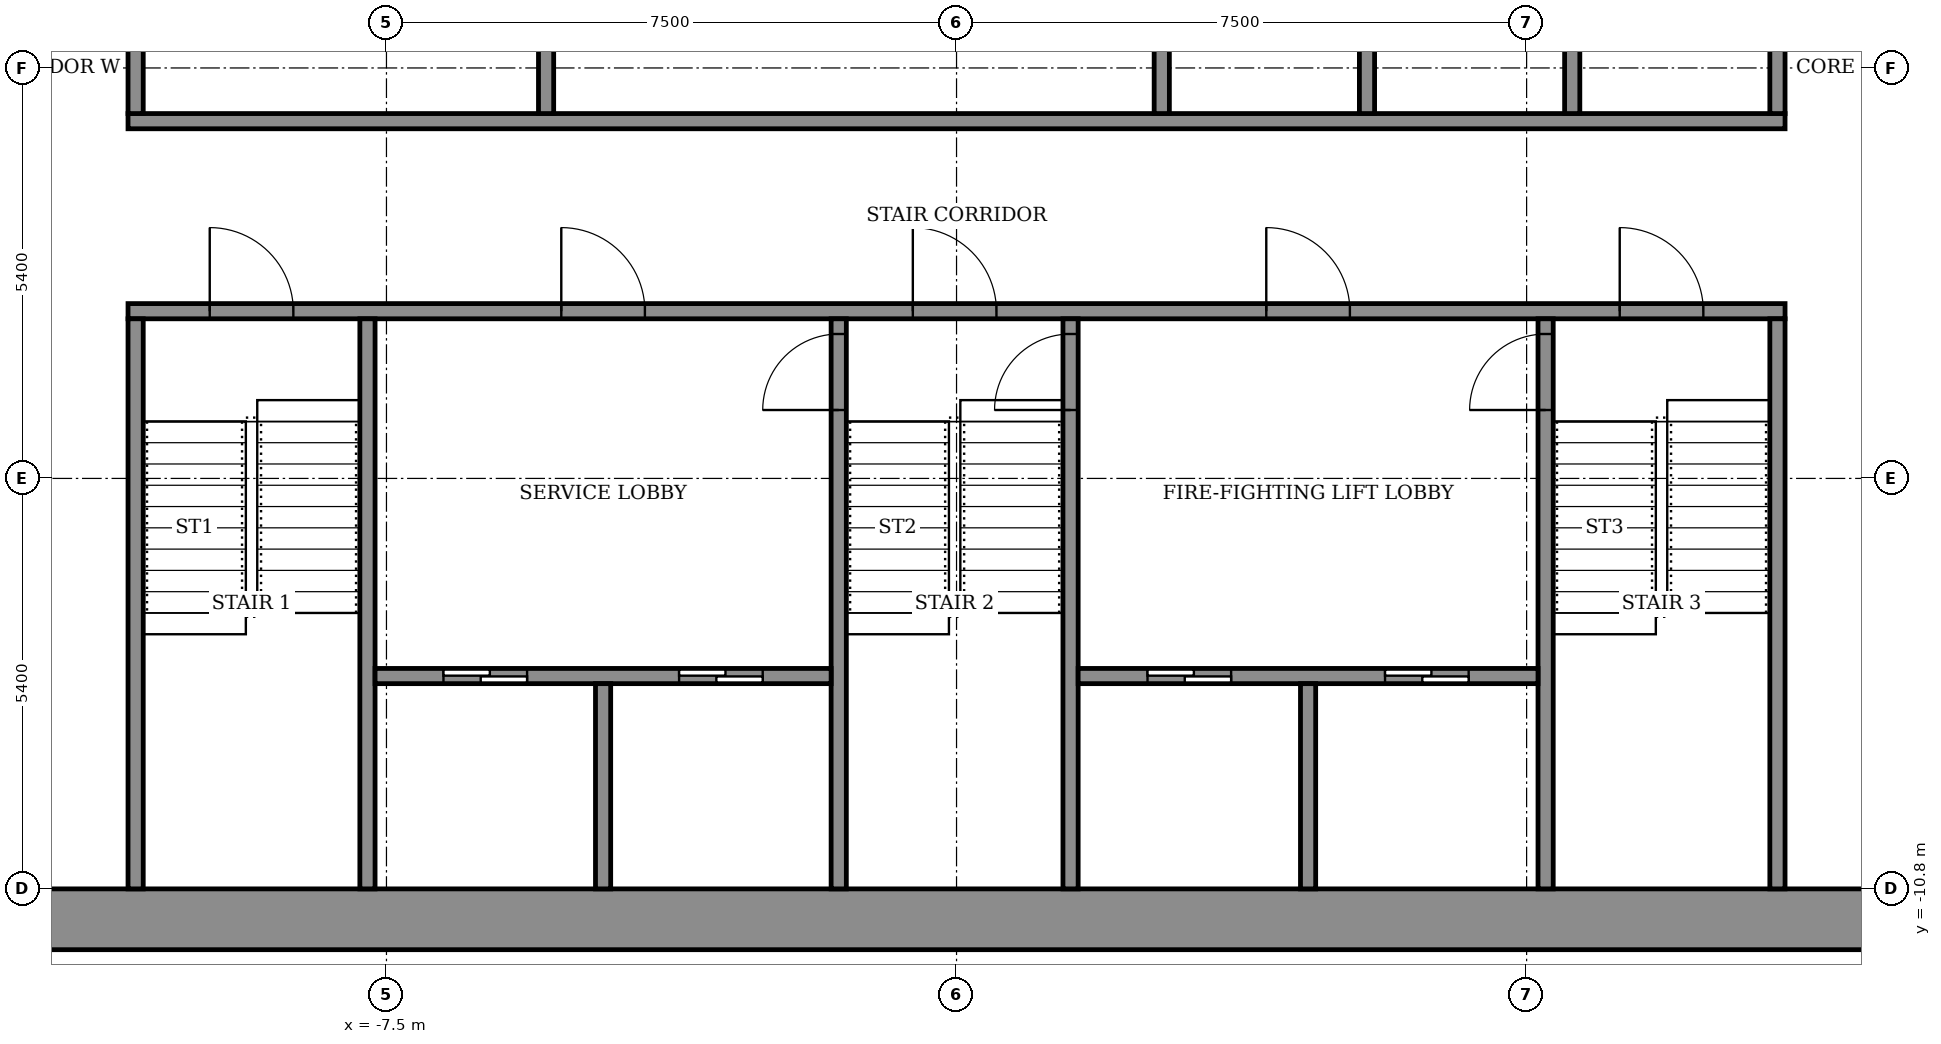
"""IFC4 building model, lengths in metres.
Left out: names, types, materials, properties, quantities, classifications, styles, units other than length and angle.
Written with IfcOpenShell. Run it as: python <this file> out.ifc"""

import sys

from ifc_helpers import new_model, si_unit, direction, frame, frame_2d, origin, place, context, subcontext, project, spatial, rectangle, extrude, element, fill, save


model = new_model("IFC4")
c1 = context("Model", 3, precision=1e-05, world=origin(), true_north=direction((0.0, 1.0)))
c2 = subcontext(c1, "Body", "Model", "MODEL_VIEW")
j1 = project(units=[si_unit("LENGTHUNIT", "METRE"), si_unit("PLANEANGLEUNIT", "RADIAN")], contexts=[c1])
p1 = place(None, origin())
s1 = spatial("IfcSite", under=j1, at=p1, CompositionType="ELEMENT")
p2 = place(p1, origin())
s2 = spatial("IfcBuilding", under=s1, at=p2, CompositionType="ELEMENT")
p3 = place(p2, frame((0.0, 0.0, 208.7)))
s3 = spatial("IfcBuildingStorey", under=s2, at=p3, CompositionType="ELEMENT", Elevation=208.7)
p4 = place(p3, frame((-14.6, -11.2, 0.0), z_axis=(0.0, 0.0, 1.0), x_axis=(1.0, 0.0, 0.0)))
e1 = element("IfcWall", 1, at=p4, inside=s3, PredefinedType="SHEAR", context=c2, shape_type="SweptSolid", body=[
    extrude(rectangle(XDim=29.2, YDim=0.8, at=frame_2d((14.6, 0.0))), origin(), (0.0, 0.0, 1.0), 3.6),
])
p5 = place(p3, frame((-10.9, -3.2, 0.0), z_axis=(0.0, 0.0, 1.0), x_axis=(1.0, 0.0, 0.0)))
e2 = element("IfcWall", 2, at=p5, inside=s3, PredefinedType="SHEAR", context=c2, shape_type="SweptSolid", body=[
    extrude(rectangle(XDim=21.8, YDim=0.2, at=frame_2d((10.9, 0.0))), origin(), (0.0, 0.0, 1.0), 3.05),
])
p6 = place(p5, frame((1.075, 0.0, 0.0)))
e3 = element("IfcOpeningElement", 3, at=p6, cuts=e2, PredefinedType="OPENING", context=c2, shape_type="SweptSolid", body=[
    extrude(rectangle(XDim=1.1, YDim=2.1, at=frame_2d((0.55, 1.05))), frame((0.0, 0.11, 0.0), z_axis=(0.0, -1.0, 0.0), x_axis=(1.0, 0.0, 0.0)), (0.0, 0.0, 1.0), 0.22),
])
p7 = place(p5, frame((10.325, 0.0, 0.0)))
e4 = element("IfcOpeningElement", 4, at=p7, cuts=e2, PredefinedType="OPENING", context=c2, shape_type="SweptSolid", body=[
    extrude(rectangle(XDim=1.1, YDim=2.1, at=frame_2d((0.55, 1.05))), frame((0.0, 0.11, 0.0), z_axis=(0.0, -1.0, 0.0), x_axis=(1.0, 0.0, 0.0)), (0.0, 0.0, 1.0), 0.22),
])
p8 = place(p5, frame((19.625, 0.0, 0.0)))
e5 = element("IfcOpeningElement", 5, at=p8, cuts=e2, PredefinedType="OPENING", context=c2, shape_type="SweptSolid", body=[
    extrude(rectangle(XDim=1.1, YDim=2.1, at=frame_2d((0.55, 1.05))), frame((0.0, 0.11, 0.0), z_axis=(0.0, -1.0, 0.0), x_axis=(1.0, 0.0, 0.0)), (0.0, 0.0, 1.0), 0.22),
])
p9 = place(p5, frame((5.7, 0.0, 0.0)))
e6 = element("IfcOpeningElement", 6, at=p9, cuts=e2, PredefinedType="OPENING", context=c2, shape_type="SweptSolid", body=[
    extrude(rectangle(XDim=1.1, YDim=2.1, at=frame_2d((0.55, 1.05))), frame((0.0, 0.11, 0.0), z_axis=(0.0, -1.0, 0.0), x_axis=(1.0, 0.0, 0.0)), (0.0, 0.0, 1.0), 0.22),
])
p10 = place(p5, frame((14.975, 0.0, 0.0)))
e7 = element("IfcOpeningElement", 7, at=p10, cuts=e2, PredefinedType="OPENING", context=c2, shape_type="SweptSolid", body=[
    extrude(rectangle(XDim=1.1, YDim=2.1, at=frame_2d((0.55, 1.05))), frame((0.0, 0.11, 0.0), z_axis=(0.0, -1.0, 0.0), x_axis=(1.0, 0.0, 0.0)), (0.0, 0.0, 1.0), 0.22),
])
p11 = place(p3, frame((-10.9, -0.7, 0.0), z_axis=(0.0, 0.0, 1.0), x_axis=(1.0, 0.0, 0.0)))
e8 = element("IfcWall", 8, at=p11, inside=s3, PredefinedType="SHEAR", context=c2, shape_type="SweptSolid", body=[
    extrude(rectangle(XDim=21.8, YDim=0.2, at=frame_2d((10.9, 0.0))), origin(), (0.0, 0.0, 1.0), 3.05),
])
for number, where, z_axis, x_axis in (
    (9, (-10.8, -10.8, 0.0), (0.0, 0.0, 1.0), (0.0, 1.0, 0.0)),
    (10, (-7.75, -10.8, 0.0), (0.0, 0.0, 1.0), (0.0, 1.0, 0.0)),
):
    element("IfcWall", number, at=place(p3, frame(where, z_axis=z_axis, x_axis=x_axis)), inside=s3, PredefinedType="SHEAR", context=c2, shape_type="SweptSolid", body=[
        extrude(rectangle(XDim=7.5, YDim=0.2, at=frame_2d((3.75, 0.0))), origin(), (0.0, 0.0, 1.0), 3.05),
    ])
p12 = place(p3, frame((-1.55, -10.8, 0.0), z_axis=(0.0, 0.0, 1.0), x_axis=(0.0, 1.0, 0.0)))
e11 = element("IfcWall", 11, at=p12, inside=s3, PredefinedType="SHEAR", context=c2, shape_type="SweptSolid", body=[
    extrude(rectangle(XDim=7.5, YDim=0.2, at=frame_2d((3.75, 0.0))), origin(), (0.0, 0.0, 1.0), 3.05),
])
p13 = place(p12, frame((6.3, 0.0, 0.0)))
e12 = element("IfcOpeningElement", 12, at=p13, cuts=e11, PredefinedType="OPENING", context=c2, shape_type="SweptSolid", body=[
    extrude(rectangle(XDim=1.0, YDim=2.1, at=frame_2d((0.5, 1.05))), frame((0.0, 0.11, 0.0), z_axis=(0.0, -1.0, 0.0), x_axis=(1.0, 0.0, 0.0)), (0.0, 0.0, 1.0), 0.22),
])
p14 = place(p3, frame((1.5, -10.8, 0.0), z_axis=(0.0, 0.0, 1.0), x_axis=(0.0, 1.0, 0.0)))
e13 = element("IfcWall", 13, at=p14, inside=s3, PredefinedType="SHEAR", context=c2, shape_type="SweptSolid", body=[
    extrude(rectangle(XDim=7.5, YDim=0.2, at=frame_2d((3.75, 0.0))), origin(), (0.0, 0.0, 1.0), 3.05),
])
p15 = place(p14, frame((6.3, 0.0, 0.0)))
e14 = element("IfcOpeningElement", 14, at=p15, cuts=e13, PredefinedType="OPENING", context=c2, shape_type="SweptSolid", body=[
    extrude(rectangle(XDim=1.0, YDim=2.1, at=frame_2d((0.5, 1.05))), frame((0.0, 0.11, 0.0), z_axis=(0.0, -1.0, 0.0), x_axis=(1.0, 0.0, 0.0)), (0.0, 0.0, 1.0), 0.22),
])
p16 = place(p3, frame((7.75, -10.8, 0.0), z_axis=(0.0, 0.0, 1.0), x_axis=(0.0, 1.0, 0.0)))
e15 = element("IfcWall", 15, at=p16, inside=s3, PredefinedType="SHEAR", context=c2, shape_type="SweptSolid", body=[
    extrude(rectangle(XDim=7.5, YDim=0.2, at=frame_2d((3.75, 0.0))), origin(), (0.0, 0.0, 1.0), 3.05),
])
p17 = place(p16, frame((6.3, 0.0, 0.0)))
e16 = element("IfcOpeningElement", 16, at=p17, cuts=e15, PredefinedType="OPENING", context=c2, shape_type="SweptSolid", body=[
    extrude(rectangle(XDim=1.0, YDim=2.1, at=frame_2d((0.5, 1.05))), frame((0.0, 0.11, 0.0), z_axis=(0.0, -1.0, 0.0), x_axis=(1.0, 0.0, 0.0)), (0.0, 0.0, 1.0), 0.22),
])
p18 = place(p3, frame((10.8, -10.8, 0.0), z_axis=(0.0, 0.0, 1.0), x_axis=(0.0, 1.0, 0.0)))
e17 = element("IfcWall", 17, at=p18, inside=s3, PredefinedType="SHEAR", context=c2, shape_type="SweptSolid", body=[
    extrude(rectangle(XDim=7.5, YDim=0.2, at=frame_2d((3.75, 0.0))), origin(), (0.0, 0.0, 1.0), 3.05),
])
p19 = place(p3, frame((-7.65, -8.0, 0.0), z_axis=(0.0, 0.0, 1.0), x_axis=(1.0, 0.0, 0.0)))
e18 = element("IfcWall", 18, at=p19, inside=s3, PredefinedType="SHEAR", context=c2, shape_type="SweptSolid", body=[
    extrude(rectangle(XDim=6.0, YDim=0.2, at=frame_2d((3.0, 0.0))), origin(), (0.0, 0.0, 1.0), 3.05),
])
p20 = place(p19, frame((0.9, 0.0, 0.0)))
e19 = element("IfcOpeningElement", 19, at=p20, cuts=e18, PredefinedType="OPENING", context=c2, shape_type="SweptSolid", body=[
    extrude(rectangle(XDim=1.1, YDim=2.1, at=frame_2d((0.55, 1.05))), frame((0.0, 0.11, 0.0), z_axis=(0.0, -1.0, 0.0), x_axis=(1.0, 0.0, 0.0)), (0.0, 0.0, 1.0), 0.22),
])
p21 = place(p19, frame((4.0, 0.0, 0.0)))
e20 = element("IfcOpeningElement", 20, at=p21, cuts=e18, PredefinedType="OPENING", context=c2, shape_type="SweptSolid", body=[
    extrude(rectangle(XDim=1.1, YDim=2.1, at=frame_2d((0.55, 1.05))), frame((0.0, 0.11, 0.0), z_axis=(0.0, -1.0, 0.0), x_axis=(1.0, 0.0, 0.0)), (0.0, 0.0, 1.0), 0.22),
])
p22 = place(p3, frame((-4.65, -10.8, 0.0), z_axis=(0.0, 0.0, 1.0), x_axis=(0.0, 1.0, 0.0)))
e21 = element("IfcWall", 21, at=p22, inside=s3, PredefinedType="SHEAR", context=c2, shape_type="SweptSolid", body=[
    extrude(rectangle(XDim=2.7, YDim=0.2, at=frame_2d((1.35, 0.0))), origin(), (0.0, 0.0, 1.0), 3.05),
])
p23 = place(p3, frame((1.6, -8.0, 0.0), z_axis=(0.0, 0.0, 1.0), x_axis=(1.0, 0.0, 0.0)))
e22 = element("IfcWall", 22, at=p23, inside=s3, PredefinedType="SHEAR", context=c2, shape_type="SweptSolid", body=[
    extrude(rectangle(XDim=6.05, YDim=0.2, at=frame_2d((3.025, 0.0))), origin(), (0.0, 0.0, 1.0), 3.05),
])
p24 = place(p23, frame((0.913, 0.0, 0.0)))
e23 = element("IfcOpeningElement", 23, at=p24, cuts=e22, PredefinedType="OPENING", context=c2, shape_type="SweptSolid", body=[
    extrude(rectangle(XDim=1.1, YDim=2.1, at=frame_2d((0.55, 1.05))), frame((0.0, 0.11, 0.0), z_axis=(0.0, -1.0, 0.0), x_axis=(1.0, 0.0, 0.0)), (0.0, 0.0, 1.0), 0.22),
])
p25 = place(p23, frame((4.038, 0.0, 0.0)))
e24 = element("IfcOpeningElement", 24, at=p25, cuts=e22, PredefinedType="OPENING", context=c2, shape_type="SweptSolid", body=[
    extrude(rectangle(XDim=1.1, YDim=2.1, at=frame_2d((0.55, 1.05))), frame((0.0, 0.11, 0.0), z_axis=(0.0, -1.0, 0.0), x_axis=(1.0, 0.0, 0.0)), (0.0, 0.0, 1.0), 0.22),
])
p26 = place(p3, frame((4.625, -10.8, 0.0), z_axis=(0.0, 0.0, 1.0), x_axis=(0.0, 1.0, 0.0)))
e25 = element("IfcWall", 25, at=p26, inside=s3, PredefinedType="SHEAR", context=c2, shape_type="SweptSolid", body=[
    extrude(rectangle(XDim=2.7, YDim=0.2, at=frame_2d((1.35, 0.0))), origin(), (0.0, 0.0, 1.0), 3.05),
])
for number, where, z_axis, x_axis in (
    (26, (-10.8, -0.6, 0.0), (0.0, 0.0, 1.0), (0.0, 1.0, 0.0)),
    (27, (-5.4, -0.6, 0.0), (0.0, 0.0, 1.0), (0.0, 1.0, 0.0)),
):
    element("IfcWall", number, at=place(p3, frame(where, z_axis=z_axis, x_axis=x_axis)), inside=s3, PredefinedType="STANDARD", context=c2, shape_type="SweptSolid", body=[
        extrude(rectangle(XDim=2.5, YDim=0.2, at=frame_2d((1.25, 0.0))), origin(), (0.0, 0.0, 1.0), 3.05),
    ])
for number, where, z_axis, x_axis in (
    (28, (2.7, -0.6, 0.0), (0.0, 0.0, 1.0), (0.0, 1.0, 0.0)),
    (29, (5.4, -0.6, 0.0), (0.0, 0.0, 1.0), (0.0, 1.0, 0.0)),
    (30, (8.1, -0.6, 0.0), (0.0, 0.0, 1.0), (0.0, 1.0, 0.0)),
    (31, (10.8, -0.6, 0.0), (0.0, 0.0, 1.0), (0.0, 1.0, 0.0)),
):
    element("IfcWall", number, at=place(p3, frame(where, z_axis=z_axis, x_axis=x_axis)), inside=s3, PredefinedType="SHEAR", context=c2, shape_type="SweptSolid", body=[
        extrude(rectangle(XDim=2.5, YDim=0.2, at=frame_2d((1.25, 0.0))), origin(), (0.0, 0.0, 1.0), 3.05),
    ])
p27 = place(p24, origin())
e32 = element("IfcDoor", 32, at=p27, inside=s3, OperationType="SLIDING_TO_LEFT", PredefinedType="DOOR", context=c2, shape_type="SweptSolid", body=[
    extrude(rectangle(XDim=1.1, YDim=2.1, at=frame_2d((0.55, 1.05))), frame((0.0, 0.025, 0.0), z_axis=(0.0, -1.0, 0.0), x_axis=(1.0, 0.0, 0.0)), (0.0, 0.0, 1.0), 0.05),
])
fill(e23, e32)
p28 = place(p20, origin())
e33 = element("IfcDoor", 33, at=p28, inside=s3, OperationType="SLIDING_TO_LEFT", PredefinedType="DOOR", context=c2, shape_type="SweptSolid", body=[
    extrude(rectangle(XDim=1.1, YDim=2.1, at=frame_2d((0.55, 1.05))), frame((0.0, 0.025, 0.0), z_axis=(0.0, -1.0, 0.0), x_axis=(1.0, 0.0, 0.0)), (0.0, 0.0, 1.0), 0.05),
])
fill(e19, e33)
p29 = place(p25, origin())
e34 = element("IfcDoor", 34, at=p29, inside=s3, OperationType="SLIDING_TO_LEFT", PredefinedType="DOOR", context=c2, shape_type="SweptSolid", body=[
    extrude(rectangle(XDim=1.1, YDim=2.1, at=frame_2d((0.55, 1.05))), frame((0.0, 0.025, 0.0), z_axis=(0.0, -1.0, 0.0), x_axis=(1.0, 0.0, 0.0)), (0.0, 0.0, 1.0), 0.05),
])
fill(e24, e34)
p30 = place(p21, origin())
e35 = element("IfcDoor", 35, at=p30, inside=s3, OperationType="SLIDING_TO_LEFT", PredefinedType="DOOR", context=c2, shape_type="SweptSolid", body=[
    extrude(rectangle(XDim=1.1, YDim=2.1, at=frame_2d((0.55, 1.05))), frame((0.0, 0.025, 0.0), z_axis=(0.0, -1.0, 0.0), x_axis=(1.0, 0.0, 0.0)), (0.0, 0.0, 1.0), 0.05),
])
fill(e20, e35)
p31 = place(p6, origin())
e36 = element("IfcDoor", 36, at=p31, inside=s3, OperationType="SINGLE_SWING_RIGHT", PredefinedType="DOOR", context=c2, shape_type="SweptSolid", body=[
    extrude(rectangle(XDim=1.1, YDim=2.1, at=frame_2d((0.55, 1.05))), frame((0.0, 0.025, 0.0), z_axis=(0.0, -1.0, 0.0), x_axis=(1.0, 0.0, 0.0)), (0.0, 0.0, 1.0), 0.05),
])
fill(e3, e36)
p32 = place(p7, origin())
e37 = element("IfcDoor", 37, at=p32, inside=s3, OperationType="SINGLE_SWING_RIGHT", PredefinedType="DOOR", context=c2, shape_type="SweptSolid", body=[
    extrude(rectangle(XDim=1.1, YDim=2.1, at=frame_2d((0.55, 1.05))), frame((0.0, 0.025, 0.0), z_axis=(0.0, -1.0, 0.0), x_axis=(1.0, 0.0, 0.0)), (0.0, 0.0, 1.0), 0.05),
])
fill(e4, e37)
p33 = place(p8, origin())
e38 = element("IfcDoor", 38, at=p33, inside=s3, OperationType="SINGLE_SWING_RIGHT", PredefinedType="DOOR", context=c2, shape_type="SweptSolid", body=[
    extrude(rectangle(XDim=1.1, YDim=2.1, at=frame_2d((0.55, 1.05))), frame((0.0, 0.025, 0.0), z_axis=(0.0, -1.0, 0.0), x_axis=(1.0, 0.0, 0.0)), (0.0, 0.0, 1.0), 0.05),
])
fill(e5, e38)
p34 = place(p9, origin())
e39 = element("IfcDoor", 39, at=p34, inside=s3, OperationType="SINGLE_SWING_LEFT", PredefinedType="DOOR", context=c2, shape_type="SweptSolid", body=[
    extrude(rectangle(XDim=1.1, YDim=2.1, at=frame_2d((0.55, 1.05))), frame((0.0, 0.025, 0.0), z_axis=(0.0, -1.0, 0.0), x_axis=(1.0, 0.0, 0.0)), (0.0, 0.0, 1.0), 0.05),
])
fill(e6, e39)
p35 = place(p10, origin())
e40 = element("IfcDoor", 40, at=p35, inside=s3, OperationType="SINGLE_SWING_LEFT", PredefinedType="DOOR", context=c2, shape_type="SweptSolid", body=[
    extrude(rectangle(XDim=1.1, YDim=2.1, at=frame_2d((0.55, 1.05))), frame((0.0, 0.025, 0.0), z_axis=(0.0, -1.0, 0.0), x_axis=(1.0, 0.0, 0.0)), (0.0, 0.0, 1.0), 0.05),
])
fill(e7, e40)
p36 = place(p13, origin())
e41 = element("IfcDoor", 41, at=p36, inside=s3, OperationType="SINGLE_SWING_RIGHT", PredefinedType="DOOR", context=c2, shape_type="SweptSolid", body=[
    extrude(rectangle(XDim=1.0, YDim=2.1, at=frame_2d((0.5, 1.05))), frame((0.0, 0.025, 0.0), z_axis=(0.0, -1.0, 0.0), x_axis=(1.0, 0.0, 0.0)), (0.0, 0.0, 1.0), 0.05),
])
fill(e12, e41)
p37 = place(p15, origin())
e42 = element("IfcDoor", 42, at=p37, inside=s3, OperationType="SINGLE_SWING_RIGHT", PredefinedType="DOOR", context=c2, shape_type="SweptSolid", body=[
    extrude(rectangle(XDim=1.0, YDim=2.1, at=frame_2d((0.5, 1.05))), frame((0.0, 0.025, 0.0), z_axis=(0.0, -1.0, 0.0), x_axis=(1.0, 0.0, 0.0)), (0.0, 0.0, 1.0), 0.05),
])
fill(e14, e42)
p38 = place(p17, origin())
e43 = element("IfcDoor", 43, at=p38, inside=s3, OperationType="SINGLE_SWING_RIGHT", PredefinedType="DOOR", context=c2, shape_type="SweptSolid", body=[
    extrude(rectangle(XDim=1.0, YDim=2.1, at=frame_2d((0.5, 1.05))), frame((0.0, 0.025, 0.0), z_axis=(0.0, -1.0, 0.0), x_axis=(1.0, 0.0, 0.0)), (0.0, 0.0, 1.0), 0.05),
])
fill(e16, e43)
save(model, sys.argv[1])
